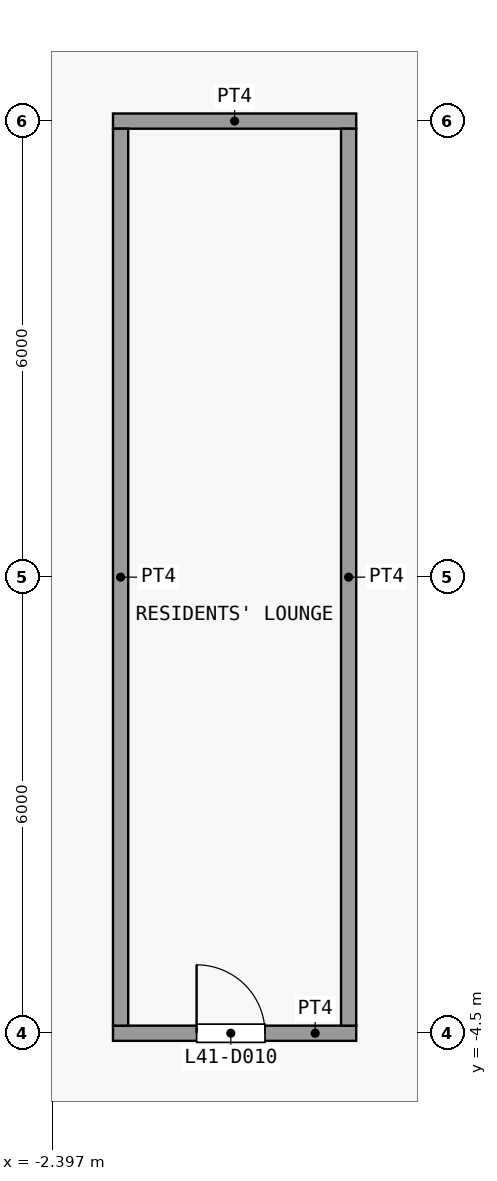
"""IFC4 building model, lengths in metres.
Left out: names, types, materials, properties, quantities, classifications, styles, units other than length and angle.
Written with IfcOpenShell. Run it as: python <this file> out.ifc"""

import sys

from ifc_helpers import new_model, si_unit, direction, frame, frame_2d, origin, place, context, subcontext, project, spatial, rectangle, extrude, element, fill, save


model = new_model("IFC4")
c1 = context("Model", 3, precision=1e-05, world=origin(), true_north=direction((0.0, 1.0)))
c2 = subcontext(c1, "Body", "Model", "MODEL_VIEW")
j1 = project(units=[si_unit("LENGTHUNIT", "METRE"), si_unit("PLANEANGLEUNIT", "RADIAN")], contexts=[c1])
p1 = place(None, origin())
s1 = spatial("IfcSite", under=j1, at=p1, CompositionType="ELEMENT")
p2 = place(p1, origin())
s2 = spatial("IfcBuilding", under=s1, at=p2, CompositionType="ELEMENT")
p3 = place(p2, frame((0.0, 0.0, 167.3)))
s3 = spatial("IfcBuildingStorey", under=s2, at=p3, CompositionType="ELEMENT", Elevation=167.3)
p4 = place(p3, frame((-1.6, -4.5, 0.0), z_axis=(0.0, 0.0, 1.0), x_axis=(1.0, 0.0, 0.0)))
e1 = element("IfcWall", 1, at=p4, inside=s3, PredefinedType="PARTITIONING", context=c2, shape_type="SweptSolid", body=[
    extrude(rectangle(XDim=3.2, YDim=0.2, at=frame_2d((1.6, 0.0))), origin(), (0.0, 0.0, 1.0), 3.3),
])
p5 = place(p4, frame((1.1, 0.0, 0.0)))
e2 = element("IfcOpeningElement", 2, at=p5, cuts=e1, PredefinedType="OPENING", context=c2, shape_type="SweptSolid", body=[
    extrude(rectangle(XDim=0.9, YDim=2.1, at=frame_2d((0.45, 1.05))), frame((0.0, 0.11, 0.0), z_axis=(0.0, -1.0, 0.0), x_axis=(1.0, 0.0, 0.0)), (0.0, 0.0, 1.0), 0.22),
])
p6 = place(p3, frame((-1.6, 7.5, 0.0), z_axis=(0.0, 0.0, 1.0), x_axis=(1.0, 0.0, 0.0)))
e3 = element("IfcWall", 3, at=p6, inside=s3, PredefinedType="PARTITIONING", context=c2, shape_type="SweptSolid", body=[
    extrude(rectangle(XDim=3.2, YDim=0.2, at=frame_2d((1.6, 0.0))), origin(), (0.0, 0.0, 1.0), 3.3),
])
for number, where, z_axis, x_axis in (
    (4, (-1.5, -4.4, 0.0), (0.0, 0.0, 1.0), (0.0, 1.0, 0.0)),
    (5, (1.5, -4.4, 0.0), (0.0, 0.0, 1.0), (0.0, 1.0, 0.0)),
):
    element("IfcWall", number, at=place(p3, frame(where, z_axis=z_axis, x_axis=x_axis)), inside=s3, PredefinedType="PARTITIONING", context=c2, shape_type="SweptSolid", body=[
        extrude(rectangle(XDim=11.8, YDim=0.2, at=frame_2d((5.9, 0.0))), origin(), (0.0, 0.0, 1.0), 3.3),
    ])
p7 = place(p5, origin())
e6 = element("IfcDoor", 6, at=p7, inside=s3, OperationType="SINGLE_SWING_RIGHT", PredefinedType="DOOR", context=c2, shape_type="SweptSolid", body=[
    extrude(rectangle(XDim=0.9, YDim=2.1, at=frame_2d((0.45, 1.05))), frame((0.0, 0.025, 0.0), z_axis=(0.0, -1.0, 0.0), x_axis=(1.0, 0.0, 0.0)), (0.0, 0.0, 1.0), 0.05),
])
fill(e2, e6)
save(model, sys.argv[1])
